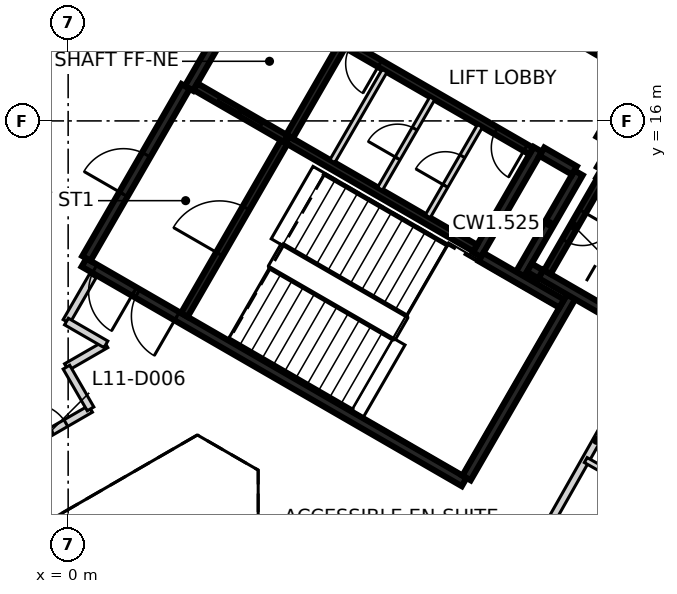
"""IFC4 building model, lengths in metres.
Left out: names, types, materials, properties, quantities, classifications, styles, units other than length and angle.
Written with IfcOpenShell. Run it as: python <this file> out.ifc"""

import sys

from ifc_helpers import new_model, si_unit, direction, frame, frame_2d, origin, place, context, subcontext, project, spatial, rectangle, extrude, element, fill, save


model = new_model("IFC4")
c1 = context("Model", 3, precision=1e-05, world=origin(), true_north=direction((0.0, 1.0)))
c2 = subcontext(c1, "Body", "Model", "MODEL_VIEW")
j1 = project(units=[si_unit("LENGTHUNIT", "METRE"), si_unit("PLANEANGLEUNIT", "RADIAN")], contexts=[c1])
p1 = place(None, origin())
s1 = spatial("IfcSite", under=j1, at=p1, CompositionType="ELEMENT")
p2 = place(p1, origin())
s2 = spatial("IfcBuilding", under=s1, at=p2, CompositionType="ELEMENT")
p3 = place(p2, frame((0.0, 0.0, 53.0)))
s3 = spatial("IfcBuildingStorey", under=s2, at=p3, CompositionType="ELEMENT", Elevation=53.0)
p4 = place(p3, frame((10.42, 6.498, 0.0), z_axis=(0.0, 0.0, 1.0), x_axis=(-0.866021906294, 0.500006057782, 0.0)))
e1 = element("IfcWall", 1, at=p4, inside=s3, PredefinedType="SHEAR", context=c2, shape_type="SweptSolid", body=[
    extrude(rectangle(XDim=11.55, YDim=0.25, at=frame_2d((5.775, 0.0))), origin(), (0.0, 0.0, 1.0), 3.125),
])
p5 = place(p4, frame((10.025, 0.0, 0.0)))
e2 = element("IfcOpeningElement", 2, at=p5, cuts=e1, PredefinedType="OPENING", context=c2, shape_type="SweptSolid", body=[
    extrude(rectangle(XDim=1.2, YDim=2.1, at=frame_2d((0.6, 1.05))), frame((0.0, 0.135, 0.0), z_axis=(0.0, -1.0, 0.0), x_axis=(1.0, 0.0, 0.0)), (0.0, 0.0, 1.0), 0.27),
])
p6 = place(p4, frame((8.725, 0.0, 0.0)))
e3 = element("IfcOpeningElement", 3, at=p6, cuts=e1, PredefinedType="OPENING", context=c2, shape_type="SweptSolid", body=[
    extrude(rectangle(XDim=1.2, YDim=2.1, at=frame_2d((0.6, 1.05))), frame((0.0, 0.135, 0.0), z_axis=(0.0, -1.0, 0.0), x_axis=(1.0, 0.0, 0.0)), (0.0, 0.0, 1.0), 0.27),
])
p7 = place(p3, frame((3.179, 16.856, 0.0), z_axis=(0.0, 0.0, 1.0), x_axis=(0.500004234368, 0.866022959057, 0.0)))
e4 = element("IfcWall", 4, at=p7, inside=s3, PredefinedType="SHEAR", context=c2, shape_type="SweptSolid", body=[
    extrude(rectangle(XDim=6.25, YDim=0.25, at=frame_2d((3.125, 0.0))), origin(), (0.0, 0.0, 1.0), 3.125),
])
p8 = place(p3, frame((0.48, 12.381, 0.0), z_axis=(0.0, 0.0, 1.0), x_axis=(0.49999885962, 0.866026062182, 0.0)))
e5 = element("IfcWall", 5, at=p8, inside=s3, PredefinedType="SHEAR", context=c2, shape_type="SweptSolid", body=[
    extrude(rectangle(XDim=5.225, YDim=0.25, at=frame_2d((2.612, 0.0))), origin(), (0.0, 0.0, 1.0), 3.125),
])
p9 = place(p8, frame((1.95, 0.0, 0.0)))
e6 = element("IfcOpeningElement", 6, at=p9, cuts=e5, PredefinedType="OPENING", context=c2, shape_type="SweptSolid", body=[
    extrude(rectangle(XDim=1.2, YDim=2.1, at=frame_2d((0.6, 1.05))), frame((0.0, 0.135, 0.0), z_axis=(0.0, -1.0, 0.0), x_axis=(1.0, 0.0, 0.0)), (0.0, 0.0, 1.0), 0.27),
])
p10 = place(p3, frame((13.238, 11.378, 0.0), z_axis=(0.0, 0.0, 1.0), x_axis=(-0.500008851346, -0.866020293397, 0.0)))
e7 = element("IfcWall", 7, at=p10, inside=s3, PredefinedType="SHEAR", context=c2, shape_type="SweptSolid", body=[
    extrude(rectangle(XDim=5.51, YDim=0.25, at=frame_2d((2.755, 0.0))), origin(), (0.0, 0.0, 1.0), 3.125),
])
p11 = place(p3, frame((12.357, 15.252, 0.0), z_axis=(0.0, 0.0, 1.0), x_axis=(-0.500028443584, -0.866008981251, 0.0)))
e8 = element("IfcWall", 8, at=p11, inside=s3, PredefinedType="SHEAR", context=c2, shape_type="SweptSolid", body=[
    extrude(rectangle(XDim=3.2, YDim=0.25, at=frame_2d((1.6, 0.0))), origin(), (0.0, 0.0, 1.0), 3.125),
])
p12 = place(p3, frame((14.918, 10.54, 0.0), z_axis=(0.0, 0.0, 1.0), x_axis=(-0.866063538972, 0.499933942099, 0.0)))
e9 = element("IfcWall", 9, at=p12, inside=s3, PredefinedType="SHEAR", context=c2, shape_type="SweptSolid", body=[
    extrude(rectangle(XDim=2.865, YDim=0.25, at=frame_2d((1.432, 0.0))), origin(), (0.0, 0.0, 1.0), 3.125),
])
p13 = place(p3, frame((13.963, 14.614, 0.0), z_axis=(0.0, 0.0, 1.0), x_axis=(0.866042235819, -0.499970844928, 0.0)))
e10 = element("IfcWall", 10, at=p13, inside=s3, PredefinedType="SHEAR", context=c2, shape_type="SweptSolid", body=[
    extrude(rectangle(XDim=2.865, YDim=0.25, at=frame_2d((1.432, 0.0))), origin(), (0.0, 0.0, 1.0), 3.125),
])
p14 = place(p3, frame((11.888, 11.961, 0.0), z_axis=(0.0, 0.0, 1.0), x_axis=(0.500003324108, 0.866023484601, 0.0)))
e11 = element("IfcWall", 11, at=p14, inside=s3, PredefinedType="SHEAR", context=c2, shape_type="SweptSolid", body=[
    extrude(rectangle(XDim=3.085, YDim=0.25, at=frame_2d((1.542, 0.0))), origin(), (0.0, 0.0, 1.0), 3.125),
])
p15 = place(p3, frame((10.865, 12.418, 0.0), z_axis=(0.0, 0.0, 1.0), x_axis=(0.866026229868, -0.499998569178, 0.0)))
e12 = element("IfcWall", 12, at=p15, inside=s3, PredefinedType="SHEAR", context=c2, shape_type="SweptSolid", body=[
    extrude(rectangle(XDim=2.449, YDim=0.25, at=frame_2d((1.225, 0.0))), origin(), (0.0, 0.0, 1.0), 3.125),
])
p16 = place(p3, frame((13.297, 18.231, 0.0), z_axis=(0.0, 0.0, 1.0), x_axis=(0.866043531843, -0.499968599967, 0.0)))
e13 = element("IfcWall", 13, at=p16, inside=s3, PredefinedType="SHEAR", context=c2, shape_type="SweptSolid", body=[
    extrude(rectangle(XDim=1.975, YDim=0.25, at=frame_2d((0.987, 0.0))), origin(), (0.0, 0.0, 1.0), 3.125),
])
p17 = place(p3, frame((14.945, 17.135, 0.0), z_axis=(0.0, 0.0, 1.0), x_axis=(-0.499983108224, -0.866035156036, 0.0)))
e14 = element("IfcWall", 14, at=p17, inside=s3, PredefinedType="SHEAR", context=c2, shape_type="SweptSolid", body=[
    extrude(rectangle(XDim=1.865, YDim=0.25, at=frame_2d((0.932, 0.0))), origin(), (0.0, 0.0, 1.0), 3.125),
])
p18 = place(p17, frame((0.535, 0.0, 0.0)))
e15 = element("IfcOpeningElement", 15, at=p18, cuts=e14, PredefinedType="OPENING", context=c2, shape_type="SweptSolid", body=[
    extrude(rectangle(XDim=1.25, YDim=2.1, at=frame_2d((0.625, 1.05))), frame((0.0, 0.135, 0.0), z_axis=(0.0, -1.0, 0.0), x_axis=(1.0, 0.0, 0.0)), (0.0, 0.0, 1.0), 0.27),
])
p19 = place(p3, frame((13.322, 14.695, 0.0), z_axis=(0.0, 0.0, 1.0), x_axis=(-0.866017078145, 0.500014420154, 0.0)))
e16 = element("IfcWall", 16, at=p19, inside=s3, PredefinedType="SHEAR", context=c2, shape_type="SweptSolid", body=[
    extrude(rectangle(XDim=0.989, YDim=0.25, at=frame_2d((0.495, 0.0))), origin(), (0.0, 0.0, 1.0), 3.125),
])
p20 = place(p3, frame((14.368, 15.315, 0.0), z_axis=(0.0, 0.0, 1.0), x_axis=(-0.499897359611, -0.866084655132, 0.0)))
e17 = element("IfcWall", 17, at=p20, inside=s3, PredefinedType="SHEAR", context=c2, shape_type="SweptSolid", body=[
    extrude(rectangle(XDim=0.685, YDim=0.25, at=frame_2d((0.342, 0.0))), origin(), (0.0, 0.0, 1.0), 3.125),
])
p21 = place(p3, frame((12.433, 11.964, 0.0), z_axis=(0.0, 0.0, 1.0), x_axis=(-0.866055875208, 0.499947218231, 0.0)))
e18 = element("IfcWall", 18, at=p21, inside=s3, PredefinedType="SHEAR", context=c2, shape_type="SweptSolid", body=[
    extrude(rectangle(XDim=0.345, YDim=0.25, at=frame_2d((0.172, 0.0))), origin(), (0.0, 0.0, 1.0), 3.125),
])
p22 = place(p3, frame((5.775, 15.502, 0.0), z_axis=(0.0, 0.0, 1.0), x_axis=(0.866020080793, -0.500009219579, 0.0)))
e19 = element("IfcWall", 19, at=p22, inside=s3, PredefinedType="SHEAR", context=c2, shape_type="SweptSolid", body=[
    extrude(rectangle(XDim=5.699, YDim=0.2, at=frame_2d((2.85, 0.0))), origin(), (0.0, 0.0, 1.0), 3.125),
])
p23 = place(p3, frame((12.185, 15.207, 0.0), z_axis=(0.0, 0.0, 1.0), x_axis=(-0.866020080793, 0.500009219579, 0.0)))
e20 = element("IfcWall", 20, at=p23, inside=s3, PredefinedType="SHEAR", context=c2, shape_type="SweptSolid", body=[
    extrude(rectangle(XDim=5.699, YDim=0.2, at=frame_2d((2.85, 0.0))), origin(), (0.0, 0.0, 1.0), 3.125),
])
p24 = place(p23, frame((0.174, 0.0, 0.0)))
e21 = element("IfcOpeningElement", 21, at=p24, cuts=e20, PredefinedType="OPENING", context=c2, shape_type="SweptSolid", body=[
    extrude(rectangle(XDim=0.9, YDim=2.1, at=frame_2d((0.45, 1.05))), frame((0.0, 0.11, 0.0), z_axis=(0.0, -1.0, 0.0), x_axis=(1.0, 0.0, 0.0)), (0.0, 0.0, 1.0), 0.22),
])
p25 = place(p23, frame((4.599, 0.0, 0.0)))
e22 = element("IfcOpeningElement", 22, at=p25, cuts=e20, PredefinedType="OPENING", context=c2, shape_type="SweptSolid", body=[
    extrude(rectangle(XDim=0.9, YDim=2.1, at=frame_2d((0.45, 1.05))), frame((0.0, 0.11, 0.0), z_axis=(0.0, -1.0, 0.0), x_axis=(1.0, 0.0, 0.0)), (0.0, 0.0, 1.0), 0.22),
])
p26 = place(p3, frame((3.057, 10.895, 0.0), z_axis=(0.0, 0.0, 1.0), x_axis=(0.499989418164, 0.866031513124, 0.0)))
e23 = element("IfcWall", 23, at=p26, inside=s3, PredefinedType="SHEAR", context=c2, shape_type="SweptSolid", body=[
    extrude(rectangle(XDim=5.251, YDim=0.2, at=frame_2d((2.625, 0.0))), origin(), (0.0, 0.0, 1.0), 3.125),
])
p27 = place(p26, frame((1.849, 0.0, 0.0)))
e24 = element("IfcOpeningElement", 24, at=p27, cuts=e23, PredefinedType="OPENING", context=c2, shape_type="SweptSolid", body=[
    extrude(rectangle(XDim=1.4, YDim=2.1, at=frame_2d((0.7, 1.05))), frame((0.0, 0.11, 0.0), z_axis=(0.0, -1.0, 0.0), x_axis=(1.0, 0.0, 0.0)), (0.0, 0.0, 1.0), 0.22),
])
p28 = place(p3, frame((14.008, 14.442, 0.0), z_axis=(0.0, 0.0, 1.0), x_axis=(-0.499986818241, -0.866033014143, 0.0)))
e25 = element("IfcWall", 25, at=p28, inside=s3, PredefinedType="SHEAR", context=c2, shape_type="SweptSolid", body=[
    extrude(rectangle(XDim=2.798, YDim=0.2, at=frame_2d((1.399, 0.0))), origin(), (0.0, 0.0, 1.0), 3.125),
])
p29 = place(p28, frame((0.949, 0.0, 0.0)))
e26 = element("IfcOpeningElement", 26, at=p29, cuts=e25, PredefinedType="OPENING", context=c2, shape_type="SweptSolid", body=[
    extrude(rectangle(XDim=0.9, YDim=2.1, at=frame_2d((0.45, 1.05))), frame((0.0, 0.11, 0.0), z_axis=(0.0, -1.0, 0.0), x_axis=(1.0, 0.0, 0.0)), (0.0, 0.0, 1.0), 0.22),
])
p30 = place(p3, frame((7.199, 17.97, 0.0), z_axis=(0.0, 0.0, 1.0), x_axis=(-0.499968400327, -0.866043647095, 0.0)))
e27 = element("IfcWall", 27, at=p30, inside=s3, PredefinedType="SHEAR", context=c2, shape_type="SweptSolid", body=[
    extrude(rectangle(XDim=2.75, YDim=0.2, at=frame_2d((1.375, 0.0))), origin(), (0.0, 0.0, 1.0), 3.125),
])
p31 = place(p3, frame((5.725, 15.531, 0.0), z_axis=(0.0, 0.0, 1.0), x_axis=(-0.866037306777, 0.499979382845, 0.0)))
e28 = element("IfcWall", 28, at=p31, inside=s3, PredefinedType="SHEAR", context=c2, shape_type="SweptSolid", body=[
    extrude(rectangle(XDim=2.742, YDim=0.2, at=frame_2d((1.371, 0.0))), origin(), (0.0, 0.0, 1.0), 3.125),
])
p32 = place(p31, frame((0.743, 0.0, 0.0)))
e29 = element("IfcOpeningElement", 29, at=p32, cuts=e28, PredefinedType="OPENING", context=c2, shape_type="SweptSolid", body=[
    extrude(rectangle(XDim=1.3, YDim=2.1, at=frame_2d((0.65, 1.05))), frame((0.0, 0.11, 0.0), z_axis=(0.0, -1.0, 0.0), x_axis=(1.0, 0.0, 0.0)), (0.0, 0.0, 1.0), 0.22),
])
p33 = place(p3, frame((9.462, 13.489, 0.0), z_axis=(0.0, 0.0, 1.0), x_axis=(0.50002746344, 0.86600954718, 0.0)))
e30 = element("IfcWall", 30, at=p33, inside=s3, PredefinedType="PARTITIONING", context=c2, shape_type="SweptSolid", body=[
    extrude(rectangle(XDim=2.748, YDim=0.15, at=frame_2d((1.374, 0.0))), origin(), (0.0, 0.0, 1.0), 3.125),
])
p34 = place(p33, frame((0.924, 0.0, 0.0)))
e31 = element("IfcOpeningElement", 31, at=p34, cuts=e30, PredefinedType="OPENING", context=c2, shape_type="SweptSolid", body=[
    extrude(rectangle(XDim=0.9, YDim=2.1, at=frame_2d((0.45, 1.05))), frame((0.0, 0.085, 0.0), z_axis=(0.0, -1.0, 0.0), x_axis=(1.0, 0.0, 0.0)), (0.0, 0.0, 1.0), 0.17),
])
p35 = place(p3, frame((8.207, 14.214, 0.0), z_axis=(0.0, 0.0, 1.0), x_axis=(0.499922376475, 0.866070215109, 0.0)))
e32 = element("IfcWall", 32, at=p35, inside=s3, PredefinedType="PARTITIONING", context=c2, shape_type="SweptSolid", body=[
    extrude(rectangle(XDim=2.749, YDim=0.15, at=frame_2d((1.374, 0.0))), origin(), (0.0, 0.0, 1.0), 3.125),
])
p36 = place(p35, frame((0.924, 0.0, 0.0)))
e33 = element("IfcOpeningElement", 33, at=p36, cuts=e32, PredefinedType="OPENING", context=c2, shape_type="SweptSolid", body=[
    extrude(rectangle(XDim=0.9, YDim=2.1, at=frame_2d((0.45, 1.05))), frame((0.0, 0.085, 0.0), z_axis=(0.0, -1.0, 0.0), x_axis=(1.0, 0.0, 0.0)), (0.0, 0.0, 1.0), 0.17),
])
p37 = place(p3, frame((6.951, 14.939, 0.0), z_axis=(0.0, 0.0, 1.0), x_axis=(0.50002746344, 0.86600954718, 0.0)))
e34 = element("IfcWall", 34, at=p37, inside=s3, PredefinedType="PARTITIONING", context=c2, shape_type="SweptSolid", body=[
    extrude(rectangle(XDim=2.748, YDim=0.15, at=frame_2d((1.374, 0.0))), origin(), (0.0, 0.0, 1.0), 3.125),
])
p38 = place(p3, frame((-5.446, 4.94, 0.0), z_axis=(0.0, 0.0, 1.0), x_axis=(0.866096332545, 0.499877127655, 0.0)))
e35 = element("IfcWall", 35, at=p38, inside=s3, PredefinedType="PARTITIONING", context=c2, shape_type="SweptSolid", body=[
    extrude(rectangle(XDim=6.969, YDim=0.2, at=frame_2d((3.484, 0.0))), origin(), (0.0, 0.0, 1.0), 3.125),
])
p39 = place(p38, frame((5.219, 0.0, 0.0)))
e36 = element("IfcOpeningElement", 36, at=p39, cuts=e35, PredefinedType="OPENING", context=c2, shape_type="SweptSolid", body=[
    extrude(rectangle(XDim=1.0, YDim=2.1, at=frame_2d((0.5, 1.05))), frame((0.0, 0.11, 0.0), z_axis=(0.0, -1.0, 0.0), x_axis=(1.0, 0.0, 0.0)), (0.0, 0.0, 1.0), 0.22),
])
p40 = place(p38, frame((3.344, 0.0, 0.0)))
e37 = element("IfcOpeningElement", 37, at=p40, cuts=e35, PredefinedType="OPENING", context=c2, shape_type="SweptSolid", body=[
    extrude(rectangle(XDim=0.95, YDim=2.1, at=frame_2d((0.475, 1.05))), frame((0.0, 0.11, 0.0), z_axis=(0.0, -1.0, 0.0), x_axis=(1.0, 0.0, 0.0)), (0.0, 0.0, 1.0), 0.22),
])
p41 = place(p3, frame((-0.045, 9.522, 0.0), z_axis=(0.0, 0.0, 1.0), x_axis=(0.86625675314, 0.499599076899, 0.0)))
e38 = element("IfcWall", 38, at=p41, inside=s3, PredefinedType="PARTITIONING", context=c2, shape_type="SweptSolid", body=[
    extrude(rectangle(XDim=1.199, YDim=0.2, at=frame_2d((0.6, 0.0))), origin(), (0.0, 0.0, 1.0), 3.125),
])
p42 = place(p3, frame((-0.045, 10.722, 0.0), z_axis=(0.0, 0.0, 1.0), x_axis=(0.500107785535, 0.865963164833, 0.0)))
e39 = element("IfcWall", 39, at=p42, inside=s3, PredefinedType="PARTITIONING", context=c2, shape_type="SweptSolid", body=[
    extrude(rectangle(XDim=1.389, YDim=0.2, at=frame_2d((0.695, 0.0))), origin(), (0.0, 0.0, 1.0), 3.125),
])
p43 = place(p3, frame((-0.045, 9.521, 0.0), z_axis=(0.0, 0.0, 1.0), x_axis=(0.500094716449, -0.865970712311, 0.0)))
e40 = element("IfcWall", 40, at=p43, inside=s3, PredefinedType="PARTITIONING", context=c2, shape_type="SweptSolid", body=[
    extrude(rectangle(XDim=1.268, YDim=0.2, at=frame_2d((0.634, 0.0))), origin(), (0.0, 0.0, 1.0), 3.125),
])
p44 = place(p3, frame((-0.045, 10.721, 0.0), z_axis=(0.0, 0.0, 1.0), x_axis=(0.865992388649, -0.500057179532, 0.0)))
e41 = element("IfcWall", 41, at=p44, inside=s3, PredefinedType="PARTITIONING", context=c2, shape_type="SweptSolid", body=[
    extrude(rectangle(XDim=1.199, YDim=0.2, at=frame_2d((0.6, 0.0))), origin(), (0.0, 0.0, 1.0), 3.125),
])
p45 = place(p3, frame((12.432, 4.992, 0.0), z_axis=(0.0, 0.0, 1.0), x_axis=(0.492790102015, 0.870148214591, 0.0)))
e42 = element("IfcWall", 42, at=p45, inside=s3, PredefinedType="PARTITIONING", context=c2, shape_type="SweptSolid", body=[
    extrude(rectangle(XDim=5.981, YDim=0.2, at=frame_2d((2.991, 0.0))), origin(), (0.0, 0.0, 1.0), 3.125),
])
p46 = place(p3, frame((13.619, 7.076, 0.0), z_axis=(0.0, 0.0, 1.0), x_axis=(0.870725399165, -0.491769538758, 0.0)))
e43 = element("IfcWall", 43, at=p46, inside=s3, PredefinedType="PARTITIONING", context=c2, shape_type="SweptSolid", body=[
    extrude(rectangle(XDim=2.489, YDim=0.15, at=frame_2d((1.244, 0.0))), origin(), (0.0, 0.0, 1.0), 3.125),
])
p47 = place(p46, frame((0.845, 0.0, 0.0)))
e44 = element("IfcOpeningElement", 44, at=p47, cuts=e43, PredefinedType="OPENING", context=c2, shape_type="SweptSolid", body=[
    extrude(rectangle(XDim=0.8, YDim=2.1, at=frame_2d((0.4, 1.05))), frame((0.0, 0.085, 0.0), z_axis=(0.0, -1.0, 0.0), x_axis=(1.0, 0.0, 0.0)), (0.0, 0.0, 1.0), 0.17),
])
p48 = place(p32, origin())
e45 = element("IfcDoor", 45, at=p48, inside=s3, OperationType="SLIDING_TO_LEFT", PredefinedType="DOOR", context=c2, shape_type="SweptSolid", body=[
    extrude(rectangle(XDim=1.3, YDim=2.1, at=frame_2d((0.65, 1.05))), frame((0.0, 0.025, 0.0), z_axis=(0.0, -1.0, 0.0), x_axis=(1.0, 0.0, 0.0)), (0.0, 0.0, 1.0), 0.05),
])
fill(e29, e45)
p49 = place(p5, origin())
e46 = element("IfcDoor", 46, at=p49, inside=s3, OperationType="SINGLE_SWING_LEFT", PredefinedType="DOOR", context=c2, shape_type="SweptSolid", body=[
    extrude(rectangle(XDim=1.2, YDim=2.1, at=frame_2d((0.6, 1.05))), frame((0.0, 0.025, 0.0), z_axis=(0.0, -1.0, 0.0), x_axis=(1.0, 0.0, 0.0)), (0.0, 0.0, 1.0), 0.05),
])
fill(e2, e46)
p50 = place(p6, origin())
e47 = element("IfcDoor", 47, at=p50, inside=s3, OperationType="SINGLE_SWING_RIGHT", PredefinedType="DOOR", context=c2, shape_type="SweptSolid", body=[
    extrude(rectangle(XDim=1.2, YDim=2.1, at=frame_2d((0.6, 1.05))), frame((0.0, 0.025, 0.0), z_axis=(0.0, -1.0, 0.0), x_axis=(1.0, 0.0, 0.0)), (0.0, 0.0, 1.0), 0.05),
])
fill(e3, e47)
p51 = place(p27, origin())
e48 = element("IfcDoor", 48, at=p51, inside=s3, OperationType="SINGLE_SWING_LEFT", PredefinedType="DOOR", context=c2, shape_type="SweptSolid", body=[
    extrude(rectangle(XDim=1.4, YDim=2.1, at=frame_2d((0.7, 1.05))), frame((0.0, 0.025, 0.0), z_axis=(0.0, -1.0, 0.0), x_axis=(1.0, 0.0, 0.0)), (0.0, 0.0, 1.0), 0.05),
])
fill(e24, e48)
p52 = place(p24, origin())
e49 = element("IfcDoor", 49, at=p52, inside=s3, OperationType="SINGLE_SWING_RIGHT", PredefinedType="DOOR", context=c2, shape_type="SweptSolid", body=[
    extrude(rectangle(XDim=0.9, YDim=2.1, at=frame_2d((0.45, 1.05))), frame((0.0, 0.025, 0.0), z_axis=(0.0, -1.0, 0.0), x_axis=(1.0, 0.0, 0.0)), (0.0, 0.0, 1.0), 0.05),
])
fill(e21, e49)
p53 = place(p34, origin())
e50 = element("IfcDoor", 50, at=p53, inside=s3, OperationType="SINGLE_SWING_LEFT", PredefinedType="DOOR", context=c2, shape_type="SweptSolid", body=[
    extrude(rectangle(XDim=0.9, YDim=2.1, at=frame_2d((0.45, 1.05))), frame((0.0, 0.025, 0.0), z_axis=(0.0, -1.0, 0.0), x_axis=(1.0, 0.0, 0.0)), (0.0, 0.0, 1.0), 0.05),
])
fill(e31, e50)
p54 = place(p36, origin())
e51 = element("IfcDoor", 51, at=p54, inside=s3, OperationType="SINGLE_SWING_RIGHT", PredefinedType="DOOR", context=c2, shape_type="SweptSolid", body=[
    extrude(rectangle(XDim=0.9, YDim=2.1, at=frame_2d((0.45, 1.05))), frame((0.0, 0.025, 0.0), z_axis=(0.0, -1.0, 0.0), x_axis=(1.0, 0.0, 0.0)), (0.0, 0.0, 1.0), 0.05),
])
fill(e33, e51)
p55 = place(p25, origin())
e52 = element("IfcDoor", 52, at=p55, inside=s3, OperationType="SINGLE_SWING_LEFT", PredefinedType="DOOR", context=c2, shape_type="SweptSolid", body=[
    extrude(rectangle(XDim=0.9, YDim=2.1, at=frame_2d((0.45, 1.05))), frame((0.0, 0.025, 0.0), z_axis=(0.0, -1.0, 0.0), x_axis=(1.0, 0.0, 0.0)), (0.0, 0.0, 1.0), 0.05),
])
fill(e22, e52)
p56 = place(p29, origin())
e53 = element("IfcDoor", 53, at=p56, inside=s3, OperationType="SINGLE_SWING_RIGHT", PredefinedType="DOOR", context=c2, shape_type="SweptSolid", body=[
    extrude(rectangle(XDim=0.9, YDim=2.1, at=frame_2d((0.45, 1.05))), frame((0.0, 0.025, 0.0), z_axis=(0.0, -1.0, 0.0), x_axis=(1.0, 0.0, 0.0)), (0.0, 0.0, 1.0), 0.05),
])
fill(e26, e53)
p57 = place(p9, origin())
e54 = element("IfcDoor", 54, at=p57, inside=s3, OperationType="SINGLE_SWING_RIGHT", PredefinedType="DOOR", context=c2, shape_type="SweptSolid", body=[
    extrude(rectangle(XDim=1.2, YDim=2.1, at=frame_2d((0.6, 1.05))), frame((0.0, 0.025, 0.0), z_axis=(0.0, -1.0, 0.0), x_axis=(1.0, 0.0, 0.0)), (0.0, 0.0, 1.0), 0.05),
])
fill(e6, e54)
p58 = place(p39, origin())
e55 = element("IfcDoor", 55, at=p58, inside=s3, OperationType="SINGLE_SWING_LEFT", PredefinedType="DOOR", context=c2, shape_type="SweptSolid", body=[
    extrude(rectangle(XDim=1.0, YDim=2.1, at=frame_2d((0.5, 1.05))), frame((0.0, 0.025, 0.0), z_axis=(0.0, -1.0, 0.0), x_axis=(1.0, 0.0, 0.0)), (0.0, 0.0, 1.0), 0.05),
])
fill(e36, e55)
save(model, sys.argv[1])
